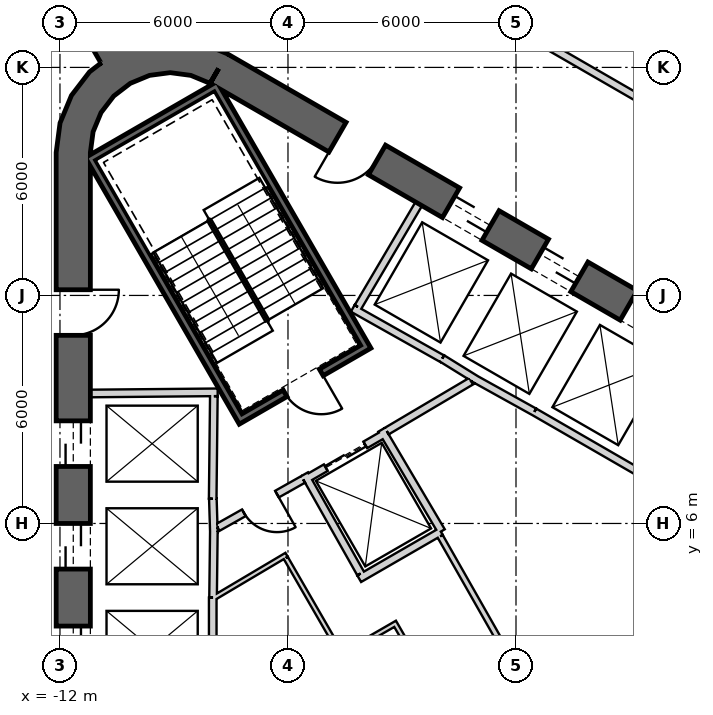
"""IFC4 building model, lengths in metres.
Left out: names, types, materials, properties, quantities, classifications, styles, units other than length and angle.
Written with IfcOpenShell. Run it as: python <this file> out.ifc"""

import sys

from ifc_helpers import new_model, si_unit, direction, frame, frame_2d, origin, place, context, subcontext, project, spatial, polyline, rectangle, outline, extrude, element, fill, save


model = new_model("IFC4")
c1 = context("Model", 3, precision=1e-05, world=origin(), true_north=direction((0.0, 1.0)))
c2 = subcontext(c1, "Body", "Model", "MODEL_VIEW")
j1 = project(units=[si_unit("LENGTHUNIT", "METRE"), si_unit("PLANEANGLEUNIT", "RADIAN")], contexts=[c1])
p1 = place(None, origin())
s1 = spatial("IfcSite", under=j1, at=p1, CompositionType="ELEMENT")
p2 = place(p1, origin())
s2 = spatial("IfcBuilding", under=s1, at=p2, CompositionType="ELEMENT")
p3 = place(p2, frame((0.0, 0.0, 70.1)))
s3 = spatial("IfcBuildingStorey", under=s2, at=p3, CompositionType="ELEMENT", Elevation=70.1)
p4 = place(p3, frame((19.475, 2.208, 0.0), z_axis=(0.0, 0.0, 1.0), x_axis=(-0.866028369851, 0.499994862586, 0.0)))
e1 = element("IfcWall", 1, at=p4, inside=s3, PredefinedType="SHEAR", context=c2, shape_type="SweptSolid", body=[
    extrude(rectangle(XDim=31.523, YDim=0.9, at=frame_2d((15.762, 0.0))), origin(), (0.0, 0.0, 1.0), 4.1),
])
p5 = place(p4, frame((7.062, 0.0, 0.0)))
e2 = element("IfcOpeningElement", 2, at=p5, cuts=e1, PredefinedType="OPENING", context=c2, shape_type="SweptSolid", body=[
    extrude(rectangle(XDim=1.2, YDim=2.4, at=frame_2d((0.6, 1.2))), frame((0.0, 0.46, 0.0), z_axis=(0.0, -1.0, 0.0), x_axis=(1.0, 0.0, 0.0)), (0.0, 0.0, 1.0), 0.92),
])
p6 = place(p4, frame((9.762, 0.0, 0.0)))
e3 = element("IfcOpeningElement", 3, at=p6, cuts=e1, PredefinedType="OPENING", context=c2, shape_type="SweptSolid", body=[
    extrude(rectangle(XDim=1.2, YDim=2.4, at=frame_2d((0.6, 1.2))), frame((0.0, 0.46, 0.0), z_axis=(0.0, -1.0, 0.0), x_axis=(1.0, 0.0, 0.0)), (0.0, 0.0, 1.0), 0.92),
])
p7 = place(p4, frame((12.462, 0.0, 0.0)))
e4 = element("IfcOpeningElement", 4, at=p7, cuts=e1, PredefinedType="OPENING", context=c2, shape_type="SweptSolid", body=[
    extrude(rectangle(XDim=1.2, YDim=2.4, at=frame_2d((0.6, 1.2))), frame((0.0, 0.46, 0.0), z_axis=(0.0, -1.0, 0.0), x_axis=(1.0, 0.0, 0.0)), (0.0, 0.0, 1.0), 0.92),
])
p8 = place(p4, frame((15.162, 0.0, 0.0)))
e5 = element("IfcOpeningElement", 5, at=p8, cuts=e1, PredefinedType="OPENING", context=c2, shape_type="SweptSolid", body=[
    extrude(rectangle(XDim=1.2, YDim=2.4, at=frame_2d((0.6, 1.2))), frame((0.0, 0.46, 0.0), z_axis=(0.0, -1.0, 0.0), x_axis=(1.0, 0.0, 0.0)), (0.0, 0.0, 1.0), 0.92),
])
p9 = place(p4, frame((17.862, 0.0, 0.0)))
e6 = element("IfcOpeningElement", 6, at=p9, cuts=e1, PredefinedType="OPENING", context=c2, shape_type="SweptSolid", body=[
    extrude(rectangle(XDim=1.2, YDim=2.4, at=frame_2d((0.6, 1.2))), frame((0.0, 0.46, 0.0), z_axis=(0.0, -1.0, 0.0), x_axis=(1.0, 0.0, 0.0)), (0.0, 0.0, 1.0), 0.92),
])
p10 = place(p4, frame((20.562, 0.0, 0.0)))
e7 = element("IfcOpeningElement", 7, at=p10, cuts=e1, PredefinedType="OPENING", context=c2, shape_type="SweptSolid", body=[
    extrude(rectangle(XDim=1.2, YDim=2.4, at=frame_2d((0.6, 1.2))), frame((0.0, 0.46, 0.0), z_axis=(0.0, -1.0, 0.0), x_axis=(1.0, 0.0, 0.0)), (0.0, 0.0, 1.0), 0.92),
])
p11 = place(p4, frame((23.262, 0.0, 0.0)))
e8 = element("IfcOpeningElement", 8, at=p11, cuts=e1, PredefinedType="OPENING", context=c2, shape_type="SweptSolid", body=[
    extrude(rectangle(XDim=1.2, YDim=2.4, at=frame_2d((0.6, 1.2))), frame((0.0, 0.46, 0.0), z_axis=(0.0, -1.0, 0.0), x_axis=(1.0, 0.0, 0.0)), (0.0, 0.0, 1.0), 0.92),
])
p12 = place(p4, frame((3.612, 0.0, 0.0)))
e9 = element("IfcOpeningElement", 9, at=p12, cuts=e1, PredefinedType="OPENING", context=c2, shape_type="SweptSolid", body=[
    extrude(rectangle(XDim=1.2, YDim=2.4, at=frame_2d((0.6, 1.2))), frame((0.0, 0.46, 0.0), z_axis=(0.0, -1.0, 0.0), x_axis=(1.0, 0.0, 0.0)), (0.0, 0.0, 1.0), 0.92),
])
p13 = place(p4, frame((26.712, 0.0, 0.0)))
e10 = element("IfcOpeningElement", 10, at=p13, cuts=e1, PredefinedType="OPENING", context=c2, shape_type="SweptSolid", body=[
    extrude(rectangle(XDim=1.2, YDim=2.4, at=frame_2d((0.6, 1.2))), frame((0.0, 0.46, 0.0), z_axis=(0.0, -1.0, 0.0), x_axis=(1.0, 0.0, 0.0)), (0.0, 0.0, 1.0), 0.92),
])
p14 = place(p3, frame((-11.65, 15.762, 0.0), z_axis=(0.0, 0.0, 1.0), x_axis=(0.0, -1.0, 0.0)))
e11 = element("IfcWall", 11, at=p14, inside=s3, PredefinedType="SHEAR", context=c2, shape_type="SweptSolid", body=[
    extrude(rectangle(XDim=31.523, YDim=0.9, at=frame_2d((15.762, 0.0))), origin(), (0.0, 0.0, 1.0), 4.1),
])
p15 = place(p14, frame((7.062, 0.0, 0.0)))
e12 = element("IfcOpeningElement", 12, at=p15, cuts=e11, PredefinedType="OPENING", context=c2, shape_type="SweptSolid", body=[
    extrude(rectangle(XDim=1.2, YDim=2.4, at=frame_2d((0.6, 1.2))), frame((0.0, 0.46, 0.0), z_axis=(0.0, -1.0, 0.0), x_axis=(1.0, 0.0, 0.0)), (0.0, 0.0, 1.0), 0.92),
])
p16 = place(p14, frame((9.762, 0.0, 0.0)))
e13 = element("IfcOpeningElement", 13, at=p16, cuts=e11, PredefinedType="OPENING", context=c2, shape_type="SweptSolid", body=[
    extrude(rectangle(XDim=1.2, YDim=2.4, at=frame_2d((0.6, 1.2))), frame((0.0, 0.46, 0.0), z_axis=(0.0, -1.0, 0.0), x_axis=(1.0, 0.0, 0.0)), (0.0, 0.0, 1.0), 0.92),
])
p17 = place(p14, frame((12.462, 0.0, 0.0)))
e14 = element("IfcOpeningElement", 14, at=p17, cuts=e11, PredefinedType="OPENING", context=c2, shape_type="SweptSolid", body=[
    extrude(rectangle(XDim=1.2, YDim=2.4, at=frame_2d((0.6, 1.2))), frame((0.0, 0.46, 0.0), z_axis=(0.0, -1.0, 0.0), x_axis=(1.0, 0.0, 0.0)), (0.0, 0.0, 1.0), 0.92),
])
p18 = place(p14, frame((15.162, 0.0, 0.0)))
e15 = element("IfcOpeningElement", 15, at=p18, cuts=e11, PredefinedType="OPENING", context=c2, shape_type="SweptSolid", body=[
    extrude(rectangle(XDim=1.2, YDim=2.4, at=frame_2d((0.6, 1.2))), frame((0.0, 0.46, 0.0), z_axis=(0.0, -1.0, 0.0), x_axis=(1.0, 0.0, 0.0)), (0.0, 0.0, 1.0), 0.92),
])
p19 = place(p14, frame((17.862, 0.0, 0.0)))
e16 = element("IfcOpeningElement", 16, at=p19, cuts=e11, PredefinedType="OPENING", context=c2, shape_type="SweptSolid", body=[
    extrude(rectangle(XDim=1.2, YDim=2.4, at=frame_2d((0.6, 1.2))), frame((0.0, 0.46, 0.0), z_axis=(0.0, -1.0, 0.0), x_axis=(1.0, 0.0, 0.0)), (0.0, 0.0, 1.0), 0.92),
])
p20 = place(p14, frame((20.562, 0.0, 0.0)))
e17 = element("IfcOpeningElement", 17, at=p20, cuts=e11, PredefinedType="OPENING", context=c2, shape_type="SweptSolid", body=[
    extrude(rectangle(XDim=1.2, YDim=2.4, at=frame_2d((0.6, 1.2))), frame((0.0, 0.46, 0.0), z_axis=(0.0, -1.0, 0.0), x_axis=(1.0, 0.0, 0.0)), (0.0, 0.0, 1.0), 0.92),
])
p21 = place(p14, frame((23.262, 0.0, 0.0)))
e18 = element("IfcOpeningElement", 18, at=p21, cuts=e11, PredefinedType="OPENING", context=c2, shape_type="SweptSolid", body=[
    extrude(rectangle(XDim=1.2, YDim=2.4, at=frame_2d((0.6, 1.2))), frame((0.0, 0.46, 0.0), z_axis=(0.0, -1.0, 0.0), x_axis=(1.0, 0.0, 0.0)), (0.0, 0.0, 1.0), 0.92),
])
p22 = place(p14, frame((3.612, 0.0, 0.0)))
e19 = element("IfcOpeningElement", 19, at=p22, cuts=e11, PredefinedType="OPENING", context=c2, shape_type="SweptSolid", body=[
    extrude(rectangle(XDim=1.2, YDim=2.4, at=frame_2d((0.6, 1.2))), frame((0.0, 0.46, 0.0), z_axis=(0.0, -1.0, 0.0), x_axis=(1.0, 0.0, 0.0)), (0.0, 0.0, 1.0), 0.92),
])
p23 = place(p14, frame((26.712, 0.0, 0.0)))
e20 = element("IfcOpeningElement", 20, at=p23, cuts=e11, PredefinedType="OPENING", context=c2, shape_type="SweptSolid", body=[
    extrude(rectangle(XDim=1.2, YDim=2.4, at=frame_2d((0.6, 1.2))), frame((0.0, 0.46, 0.0), z_axis=(0.0, -1.0, 0.0), x_axis=(1.0, 0.0, 0.0)), (0.0, 0.0, 1.0), 0.92),
])
p24 = place(p3, origin())
e21 = element("IfcWall", 21, at=p24, inside=s3, PredefinedType="SHEAR", context=c2, shape_type="SweptSolid", body=[
    extrude(outline(polyline([(-7.6, 18.36), (-8.323, 18.659), (-9.1, 18.762), (-9.876, 18.659), (-10.6, 18.36), (-11.221, 17.883), (-11.698, 17.262), (-11.998, 16.538), (-12.1, 15.762), (-11.2, 15.762), (-11.128, 16.305), (-10.919, 16.812), (-10.585, 17.247), (-10.15, 17.58), (-9.644, 17.79), (-9.1, 17.862), (-8.556, 17.79), (-8.05, 17.58), (-7.6, 18.36)])), origin(), (0.0, 0.0, 1.0), 4.1),
])
p25 = place(p3, frame((-10.575, 18.316, 0.0), z_axis=(0.0, 0.0, 1.0), x_axis=(-0.499998162141, 0.86602646487, 0.0)))
e22 = element("IfcWall", 22, at=p25, inside=s3, PredefinedType="SHEAR", context=c2, shape_type="SweptSolid", body=[
    extrude(rectangle(XDim=13.669, YDim=0.8, at=frame_2d((6.835, 0.0))), origin(), (0.0, 0.0, 1.0), 4.1),
])
p26 = place(p25, frame((1.9, 0.0, 0.0)))
e23 = element("IfcOpeningElement", 23, at=p26, cuts=e22, PredefinedType="OPENING", context=c2, shape_type="SweptSolid", body=[
    extrude(rectangle(XDim=1.4, YDim=2.4, at=frame_2d((0.7, 1.2))), frame((0.0, 0.41, 0.0), z_axis=(0.0, -1.0, 0.0), x_axis=(1.0, 0.0, 0.0)), (0.0, 0.0, 1.0), 0.82),
])
p27 = place(p3, frame((-11.2, 9.42, 0.0), z_axis=(0.0, 0.0, 1.0), x_axis=(0.999957167047, 0.009255488683, 0.0)))
e24 = element("IfcWall", 24, at=p27, inside=s3, PredefinedType="PLUMBINGWALL", context=c2, shape_type="SweptSolid", body=[
    extrude(rectangle(XDim=3.35, YDim=0.2, at=frame_2d((1.675, 0.0))), origin(), (0.0, 0.0, 1.0), 3.8),
])
p28 = place(p3, frame((-7.951, 9.35, 0.0), z_axis=(0.0, 0.0, 1.0), x_axis=(-0.011120469654, -0.999938165666, 0.0)))
e25 = element("IfcWall", 25, at=p28, inside=s3, PredefinedType="PLUMBINGWALL", context=c2, shape_type="SweptSolid", body=[
    extrude(rectangle(XDim=2.7, YDim=0.2, at=frame_2d((1.35, 0.0))), origin(), (0.0, 0.0, 1.0), 3.8),
])
p29 = place(p3, frame((7.497, 4.886, 0.0), z_axis=(0.0, 0.0, 1.0), x_axis=(-0.866030989016, 0.499990325971, 0.0)))
e26 = element("IfcWall", 26, at=p29, inside=s3, PredefinedType="PLUMBINGWALL", context=c2, shape_type="SweptSolid", body=[
    extrude(rectangle(XDim=8.1, YDim=0.2, at=frame_2d((4.05, 0.0))), origin(), (0.0, 0.0, 1.0), 3.8),
])
p30 = place(p3, frame((-7.977, 6.65, 0.0), z_axis=(0.0, 0.0, 1.0), x_axis=(0.030861509705, -0.999523670164, 0.0)))
e27 = element("IfcWall", 27, at=p30, inside=s3, PredefinedType="PLUMBINGWALL", context=c2, shape_type="SweptSolid", body=[
    extrude(rectangle(XDim=0.878, YDim=0.2, at=frame_2d((0.439, 0.0))), origin(), (0.0, 0.0, 1.0), 3.8),
])
p31 = place(p3, frame((-7.949, 5.895, 0.0), z_axis=(0.0, 0.0, 1.0), x_axis=(-0.012042535896, -0.999927486035, 0.0)))
e28 = element("IfcWall", 28, at=p31, inside=s3, PredefinedType="PLUMBINGWALL", context=c2, shape_type="SweptSolid", body=[
    extrude(rectangle(XDim=1.845, YDim=0.2, at=frame_2d((0.922, 0.0))), origin(), (0.0, 0.0, 1.0), 3.8),
])
p32 = place(p3, frame((-7.98, 4.05, 0.0), z_axis=(0.0, 0.0, 1.0), x_axis=(0.0, -1.0, 0.0)))
e29 = element("IfcWall", 29, at=p32, inside=s3, PredefinedType="PLUMBINGWALL", context=c2, shape_type="SweptSolid", body=[
    extrude(rectangle(XDim=8.1, YDim=0.2, at=frame_2d((4.05, 0.0))), origin(), (0.0, 0.0, 1.0), 3.8),
])
p33 = place(p3, frame((-1.941, 10.339, 0.0), z_axis=(0.0, 0.0, 1.0), x_axis=(0.850216889117, -0.526432561171, 0.0)))
e30 = element("IfcWall", 30, at=p33, inside=s3, PredefinedType="PLUMBINGWALL", context=c2, shape_type="SweptSolid", body=[
    extrude(rectangle(XDim=1.078, YDim=0.2, at=frame_2d((0.539, 0.0))), origin(), (0.0, 0.0, 1.0), 3.8),
])
p34 = place(p3, frame((0.483, 8.936, 0.0), z_axis=(0.0, 0.0, 1.0), x_axis=(-0.874269620932, 0.485440655401, 0.0)))
e31 = element("IfcWall", 31, at=p34, inside=s3, PredefinedType="PLUMBINGWALL", context=c2, shape_type="SweptSolid", body=[
    extrude(rectangle(XDim=1.845, YDim=0.2, at=frame_2d((0.922, 0.0))), origin(), (0.0, 0.0, 1.0), 3.8),
])
p35 = place(p3, frame((-4.296, 11.659, 0.0), z_axis=(0.0, 0.0, 1.0), x_axis=(0.871534483978, -0.490334215854, 0.0)))
e32 = element("IfcWall", 32, at=p35, inside=s3, PredefinedType="PLUMBINGWALL", context=c2, shape_type="SweptSolid", body=[
    extrude(rectangle(XDim=2.7, YDim=0.2, at=frame_2d((1.35, 0.0))), origin(), (0.0, 0.0, 1.0), 3.8),
])
p36 = place(p3, frame((-4.158, 11.696, 0.0), z_axis=(0.0, 0.0, 1.0), x_axis=(0.508018930956, 0.861345903683, 0.0)))
e33 = element("IfcWall", 33, at=p36, inside=s3, PredefinedType="PLUMBINGWALL", context=c2, shape_type="SweptSolid", body=[
    extrude(rectangle(XDim=3.15, YDim=0.2, at=frame_2d((1.575, 0.0))), origin(), (0.0, 0.0, 1.0), 3.8),
])
p37 = place(p3, frame((-11.245, 15.678, -0.3), z_axis=(0.0, 0.0, 1.0), x_axis=(0.499977274689, -0.866038523851, 0.0)))
e34 = element("IfcWall", 34, at=p37, inside=s3, PredefinedType="SHEAR", context=c2, shape_type="SweptSolid", body=[
    extrude(rectangle(XDim=8.1, YDim=0.2, at=frame_2d((4.05, 0.0))), origin(), (0.0, 0.0, 1.0), 4.1),
])
p38 = place(p3, frame((-7.818, 17.541, -0.3), z_axis=(0.0, 0.0, 1.0), x_axis=(-0.866044365799, -0.499967155389, 0.0)))
e35 = element("IfcWall", 35, at=p38, inside=s3, PredefinedType="SHEAR", context=c2, shape_type="SweptSolid", body=[
    extrude(rectangle(XDim=3.8, YDim=0.2, at=frame_2d((1.9, 0.0))), origin(), (0.0, 0.0, 1.0), 4.1),
])
p39 = place(p3, frame((-7.854, 17.405, -0.3), z_axis=(0.0, 0.0, 1.0), x_axis=(0.499997992926, -0.866026562566, 0.0)))
e36 = element("IfcWall", 36, at=p39, inside=s3, PredefinedType="SHEAR", context=c2, shape_type="SweptSolid", body=[
    extrude(rectangle(XDim=7.9, YDim=0.2, at=frame_2d((3.95, 0.0))), origin(), (0.0, 0.0, 1.0), 4.1),
])
p40 = place(p3, frame((-7.159, 8.8, -0.3), z_axis=(0.0, 0.0, 1.0), x_axis=(0.866047807691, 0.499961193289, 0.0)))
e37 = element("IfcWall", 37, at=p40, inside=s3, PredefinedType="SHEAR", context=c2, shape_type="SweptSolid", body=[
    extrude(rectangle(XDim=3.6, YDim=0.2, at=frame_2d((1.8, 0.0))), origin(), (0.0, 0.0, 1.0), 4.1),
])
p41 = place(p40, frame((1.25, 0.0, 0.3)))
e38 = element("IfcOpeningElement", 38, at=p41, cuts=e37, PredefinedType="OPENING", context=c2, shape_type="SweptSolid", body=[
    extrude(rectangle(XDim=1.1, YDim=2.1, at=frame_2d((0.55, 1.05))), frame((0.0, 0.11, 0.0), z_axis=(0.0, -1.0, 0.0), x_axis=(1.0, 0.0, 0.0)), (0.0, 0.0, 1.0), 0.22),
])
p42 = place(p3, frame((-5.524, 7.168, 0.0), z_axis=(0.0, 0.0, 1.0), x_axis=(0.866024647952, 0.500001309137, 0.0)))
e39 = element("IfcWall", 39, at=p42, inside=s3, PredefinedType="PLUMBINGWALL", context=c2, shape_type="SweptSolid", body=[
    extrude(rectangle(XDim=2.4, YDim=0.2, at=frame_2d((1.2, 0.0))), origin(), (0.0, 0.0, 1.0), 3.8),
])
p43 = place(p42, frame((0.6, 0.0, 0.0)))
e40 = element("IfcOpeningElement", 40, at=p43, cuts=e39, PredefinedType="OPENING", context=c2, shape_type="SweptSolid", body=[
    extrude(rectangle(XDim=1.2, YDim=2.4, at=frame_2d((0.6, 1.2))), frame((0.0, 0.11, 0.0), z_axis=(0.0, -1.0, 0.0), x_axis=(1.0, 0.0, 0.0)), (0.0, 0.0, 1.0), 0.22),
])
p44 = place(p3, frame((-3.538, 8.465, 0.0), z_axis=(0.0, 0.0, 1.0), x_axis=(0.508647062354, -0.860975125052, 0.0)))
e41 = element("IfcWall", 41, at=p44, inside=s3, PredefinedType="PLUMBINGWALL", context=c2, shape_type="SweptSolid", body=[
    extrude(rectangle(XDim=3.1, YDim=0.2, at=frame_2d((1.55, 0.0))), origin(), (0.0, 0.0, 1.0), 3.8),
])
p45 = place(p3, frame((-1.979, 5.786, 0.0), z_axis=(0.0, 0.0, 1.0), x_axis=(-0.866016689309, -0.500015093611, 0.0)))
e42 = element("IfcWall", 42, at=p45, inside=s3, PredefinedType="PLUMBINGWALL", context=c2, shape_type="SweptSolid", body=[
    extrude(rectangle(XDim=2.479, YDim=0.2, at=frame_2d((1.24, 0.0))), origin(), (0.0, 0.0, 1.0), 3.8),
])
p46 = place(p3, frame((-5.562, 7.296, 0.0), z_axis=(0.0, 0.0, 1.0), x_axis=(0.49134651263, -0.870964180966, 0.0)))
e43 = element("IfcWall", 43, at=p46, inside=s3, PredefinedType="PLUMBINGWALL", context=c2, shape_type="SweptSolid", body=[
    extrude(rectangle(XDim=3.0, YDim=0.2, at=frame_2d((1.5, 0.0))), origin(), (0.0, 0.0, 1.0), 3.8),
])
p47 = place(p3, frame((-1.18, 9.744, 0.0), z_axis=(0.0, 0.0, 1.0), x_axis=(-0.860615607571, -0.509255118781, 0.0)))
e44 = element("IfcWall", 44, at=p47, inside=s3, PredefinedType="PARTITIONING", context=c2, shape_type="SweptSolid", body=[
    extrude(rectangle(XDim=2.581, YDim=0.2, at=frame_2d((1.29, 0.0))), origin(), (0.0, 0.0, 1.0), 3.8),
])
p48 = place(p3, frame((-5.6, 7.16, 0.0), z_axis=(0.0, 0.0, 1.0), x_axis=(-0.871363259478, -0.490638431059, 0.0)))
e45 = element("IfcWall", 45, at=p48, inside=s3, PredefinedType="PARTITIONING", context=c2, shape_type="SweptSolid", body=[
    extrude(rectangle(XDim=2.581, YDim=0.2, at=frame_2d((1.291, 0.0))), origin(), (0.0, 0.0, 1.0), 3.8),
])
p49 = place(p48, frame((0.791, 0.0, 0.0)))
e46 = element("IfcOpeningElement", 46, at=p49, cuts=e45, PredefinedType="OPENING", context=c2, shape_type="SweptSolid", body=[
    extrude(rectangle(XDim=1.0, YDim=2.1, at=frame_2d((0.5, 1.05))), frame((0.0, 0.11, 0.0), z_axis=(0.0, -1.0, 0.0), x_axis=(1.0, 0.0, 0.0)), (0.0, 0.0, 1.0), 0.22),
])
p50 = place(p3, frame((-1.994, 5.661, 0.0), z_axis=(0.0, 0.0, 1.0), x_axis=(0.494341211302, -0.869267948798, 0.0)))
e47 = element("IfcWall", 47, at=p50, inside=s3, PredefinedType="PLUMBINGWALL", context=c2, shape_type="SweptSolid", body=[
    extrude(rectangle(XDim=4.361, YDim=0.15, at=frame_2d((2.18, 0.0))), origin(), (0.0, 0.0, 1.0), 3.8),
])
p51 = place(p3, frame((-6.037, 5.176, 0.0), z_axis=(0.0, 0.0, 1.0), x_axis=(-0.860106072674, -0.510115225953, 0.0)))
e48 = element("IfcWall", 48, at=p51, inside=s3, PredefinedType="PARTITIONING", context=c2, shape_type="SweptSolid", body=[
    extrude(rectangle(XDim=2.225, YDim=0.12, at=frame_2d((1.112, 0.0))), origin(), (0.0, 0.0, 1.0), 3.8),
])
p52 = place(p3, frame((-4.558, 2.495, 0.0), z_axis=(0.0, 0.0, 1.0), x_axis=(-0.499990139034, 0.866031096941, 0.0)))
e49 = element("IfcWall", 49, at=p52, inside=s3, PredefinedType="PARTITIONING", context=c2, shape_type="SweptSolid", body=[
    extrude(rectangle(XDim=3.0, YDim=0.12, at=frame_2d((1.5, 0.0))), origin(), (0.0, 0.0, 1.0), 3.8),
])
p53 = place(p3, frame((-3.129, 3.39, 0.0), z_axis=(0.0, 0.0, 1.0), x_axis=(-0.866053003207, -0.499952193351, 0.0)))
e50 = element("IfcWall", 50, at=p53, inside=s3, PredefinedType="PARTITIONING", context=c2, shape_type="SweptSolid", body=[
    extrude(rectangle(XDim=1.625, YDim=0.12, at=frame_2d((0.812, 0.0))), origin(), (0.0, 0.0, 1.0), 3.8),
])
p54 = place(p3, frame((-1.637, 0.685, 0.0), z_axis=(0.0, 0.0, 1.0), x_axis=(-0.500006252586, 0.866021793822, 0.0)))
e51 = element("IfcWall", 51, at=p54, inside=s3, PredefinedType="PARTITIONING", context=c2, shape_type="SweptSolid", body=[
    extrude(rectangle(XDim=3.028, YDim=0.12, at=frame_2d((1.514, 0.0))), origin(), (0.0, 0.0, 1.0), 3.8),
])
p55 = place(p3, frame((17.023, 9.224, 0.0), z_axis=(0.0, 0.0, 1.0), x_axis=(-0.866024925705, 0.500000828058, 0.0)))
e52 = element("IfcWall", 52, at=p55, inside=s3, PredefinedType="PARTITIONING", context=c2, shape_type="SweptSolid", body=[
    extrude(rectangle(XDim=26.647, YDim=0.2, at=frame_2d((13.323, 0.0))), origin(), (0.0, 0.0, 1.0), 2.98),
])
p56 = place(p55, frame((12.823, 0.0, 0.0)))
e53 = element("IfcOpeningElement", 53, at=p56, cuts=e52, PredefinedType="OPENING", context=c2, shape_type="SweptSolid", body=[
    extrude(rectangle(XDim=1.0, YDim=2.1, at=frame_2d((0.5, 1.05))), frame((0.0, 0.11, 0.0), z_axis=(0.0, -1.0, 0.0), x_axis=(1.0, 0.0, 0.0)), (0.0, 0.0, 1.0), 0.22),
])
p57 = place(p41, origin())
e54 = element("IfcDoor", 54, at=p57, inside=s3, OperationType="SINGLE_SWING_LEFT", PredefinedType="USERDEFINED", context=c2, shape_type="SweptSolid", body=[
    extrude(rectangle(XDim=1.1, YDim=2.1, at=frame_2d((0.55, 1.05))), frame((0.0, 0.025, 0.0), z_axis=(0.0, -1.0, 0.0), x_axis=(1.0, 0.0, 0.0)), (0.0, 0.0, 1.0), 0.05),
])
fill(e38, e54)
p58 = place(p49, origin())
e55 = element("IfcDoor", 55, at=p58, inside=s3, OperationType="SINGLE_SWING_LEFT", PredefinedType="USERDEFINED", context=c2, shape_type="SweptSolid", body=[
    extrude(rectangle(XDim=1.0, YDim=2.1, at=frame_2d((0.5, 1.05))), frame((0.0, 0.025, 0.0), z_axis=(0.0, -1.0, 0.0), x_axis=(1.0, 0.0, 0.0)), (0.0, 0.0, 1.0), 0.05),
])
fill(e46, e55)
p59 = place(p43, origin())
e56 = element("IfcDoor", 56, at=p59, inside=s3, OperationType="SLIDING_TO_LEFT", PredefinedType="USERDEFINED", context=c2, shape_type="SweptSolid", body=[
    extrude(rectangle(XDim=1.2, YDim=2.4, at=frame_2d((0.6, 1.2))), frame((0.0, 0.025, 0.0), z_axis=(0.0, -1.0, 0.0), x_axis=(1.0, 0.0, 0.0)), (0.0, 0.0, 1.0), 0.05),
])
fill(e40, e56)
p60 = place(p15, origin())
e57 = element("IfcDoor", 57, at=p60, inside=s3, OperationType="SLIDING_TO_LEFT", PredefinedType="USERDEFINED", context=c2, shape_type="SweptSolid", body=[
    extrude(rectangle(XDim=1.2, YDim=2.4, at=frame_2d((0.6, 1.2))), frame((0.0, 0.025, 0.0), z_axis=(0.0, -1.0, 0.0), x_axis=(1.0, 0.0, 0.0)), (0.0, 0.0, 1.0), 0.05),
])
fill(e12, e57)
p61 = place(p16, origin())
e58 = element("IfcDoor", 58, at=p61, inside=s3, OperationType="SLIDING_TO_LEFT", PredefinedType="USERDEFINED", context=c2, shape_type="SweptSolid", body=[
    extrude(rectangle(XDim=1.2, YDim=2.4, at=frame_2d((0.6, 1.2))), frame((0.0, 0.025, 0.0), z_axis=(0.0, -1.0, 0.0), x_axis=(1.0, 0.0, 0.0)), (0.0, 0.0, 1.0), 0.05),
])
fill(e13, e58)
p62 = place(p17, origin())
e59 = element("IfcDoor", 59, at=p62, inside=s3, OperationType="SLIDING_TO_LEFT", PredefinedType="USERDEFINED", context=c2, shape_type="SweptSolid", body=[
    extrude(rectangle(XDim=1.2, YDim=2.4, at=frame_2d((0.6, 1.2))), frame((0.0, 0.025, 0.0), z_axis=(0.0, -1.0, 0.0), x_axis=(1.0, 0.0, 0.0)), (0.0, 0.0, 1.0), 0.05),
])
fill(e14, e59)
p63 = place(p9, origin())
e60 = element("IfcDoor", 60, at=p63, inside=s3, OperationType="SLIDING_TO_LEFT", PredefinedType="USERDEFINED", context=c2, shape_type="SweptSolid", body=[
    extrude(rectangle(XDim=1.2, YDim=2.4, at=frame_2d((0.6, 1.2))), frame((0.0, 0.025, 0.0), z_axis=(0.0, -1.0, 0.0), x_axis=(1.0, 0.0, 0.0)), (0.0, 0.0, 1.0), 0.05),
])
fill(e6, e60)
p64 = place(p10, origin())
e61 = element("IfcDoor", 61, at=p64, inside=s3, OperationType="SLIDING_TO_LEFT", PredefinedType="USERDEFINED", context=c2, shape_type="SweptSolid", body=[
    extrude(rectangle(XDim=1.2, YDim=2.4, at=frame_2d((0.6, 1.2))), frame((0.0, 0.025, 0.0), z_axis=(0.0, -1.0, 0.0), x_axis=(1.0, 0.0, 0.0)), (0.0, 0.0, 1.0), 0.05),
])
fill(e7, e61)
p65 = place(p11, origin())
e62 = element("IfcDoor", 62, at=p65, inside=s3, OperationType="SLIDING_TO_LEFT", PredefinedType="USERDEFINED", context=c2, shape_type="SweptSolid", body=[
    extrude(rectangle(XDim=1.2, YDim=2.4, at=frame_2d((0.6, 1.2))), frame((0.0, 0.025, 0.0), z_axis=(0.0, -1.0, 0.0), x_axis=(1.0, 0.0, 0.0)), (0.0, 0.0, 1.0), 0.05),
])
fill(e8, e62)
p66 = place(p13, origin())
e63 = element("IfcDoor", 63, at=p66, inside=s3, OperationType="SINGLE_SWING_LEFT", PredefinedType="USERDEFINED", context=c2, shape_type="SweptSolid", body=[
    extrude(rectangle(XDim=1.2, YDim=2.4, at=frame_2d((0.6, 1.2))), frame((0.0, 0.025, 0.0), z_axis=(0.0, -1.0, 0.0), x_axis=(1.0, 0.0, 0.0)), (0.0, 0.0, 1.0), 0.05),
])
fill(e10, e63)
p67 = place(p22, origin())
e64 = element("IfcDoor", 64, at=p67, inside=s3, OperationType="SINGLE_SWING_RIGHT", PredefinedType="USERDEFINED", context=c2, shape_type="SweptSolid", body=[
    extrude(rectangle(XDim=1.2, YDim=2.4, at=frame_2d((0.6, 1.2))), frame((0.0, 0.025, 0.0), z_axis=(0.0, -1.0, 0.0), x_axis=(1.0, 0.0, 0.0)), (0.0, 0.0, 1.0), 0.05),
])
fill(e19, e64)
save(model, sys.argv[1])
